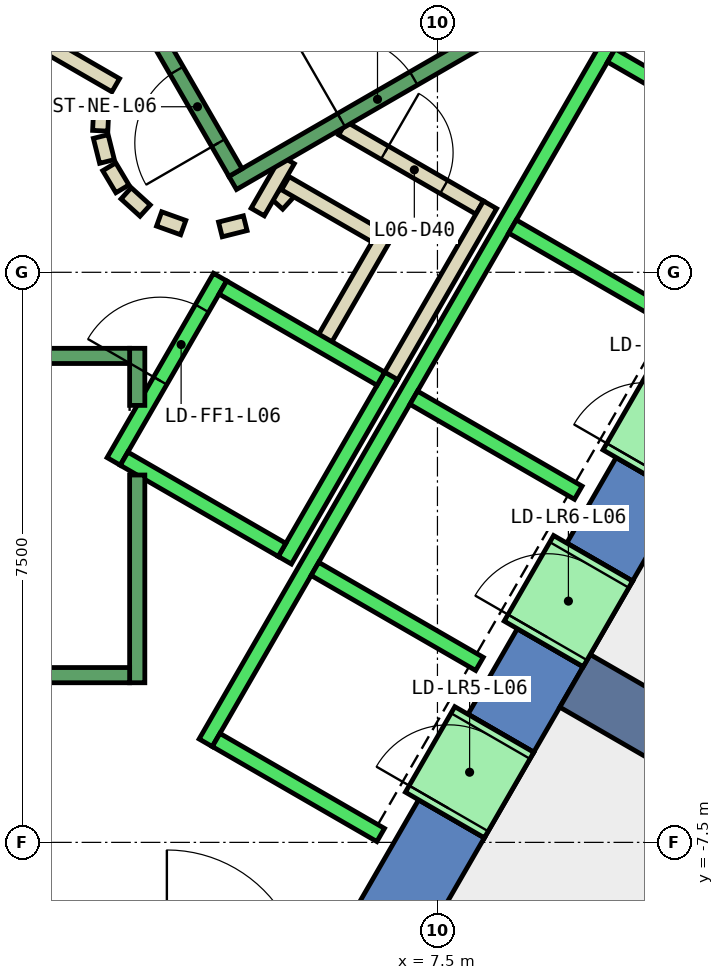
"""IFC4 building model, lengths in metres.
Left out: names, types, materials, properties, quantities, classifications, styles, units other than length and angle.
Written with IfcOpenShell. Run it as: python <this file> out.ifc"""

import sys

from ifc_helpers import new_model, si_unit, direction, frame, frame_2d, origin, place, context, subcontext, project, spatial, polyline, rectangle, outline, extrude, element, fill, save


model = new_model("IFC4")
c1 = context("Model", 3, precision=1e-05, world=origin(), true_north=direction((0.0, 1.0)))
c2 = subcontext(c1, "Body", "Model", "MODEL_VIEW")
j1 = project(units=[si_unit("LENGTHUNIT", "METRE"), si_unit("PLANEANGLEUNIT", "RADIAN")], contexts=[c1])
p1 = place(None, origin())
s1 = spatial("IfcSite", under=j1, at=p1, CompositionType="ELEMENT")
p2 = place(p1, origin())
s2 = spatial("IfcBuilding", under=s1, at=p2, CompositionType="ELEMENT")
p3 = place(p2, frame((0.0, 0.0, 35.0)))
s3 = spatial("IfcBuildingStorey", under=s2, at=p3, CompositionType="ELEMENT", Elevation=35.0)
p4 = place(p3, frame((0.0, 0.0, -0.6)))
e1 = element("IfcWall", 1, at=p4, inside=s3, PredefinedType="SHEAR", context=c2, shape_type="SweptSolid", body=[
    extrude(outline(polyline([(8.517, 11.748), (7.651, 11.248), (12.702, 2.5), (13.856, 2.5), (8.517, 11.748)])), origin(), (0.0, 0.0, 1.0), 4.4),
])
p5 = place(p3, frame((0.0, 0.0, -0.6)))
e2 = element("IfcWall", 2, at=p5, inside=s3, PredefinedType="SHEAR", context=c2, shape_type="SweptSolid", body=[
    extrude(outline(polyline([(8.117, -7.44), (7.252, -6.94), (6.351, -8.5), (6.928, -9.5), (8.117, -7.44)])), origin(), (0.0, 0.0, 1.0), 4.4),
])
p6 = place(p3, frame((0.0, 0.0, -0.6)))
e3 = element("IfcWall", 3, at=p6, inside=s3, PredefinedType="SHEAR", context=c2, shape_type="SweptSolid", body=[
    extrude(outline(polyline([(9.417, -5.189), (8.551, -4.689), (7.902, -5.814), (8.767, -6.314), (9.417, -5.189)])), origin(), (0.0, 0.0, 1.0), 4.4),
])
p7 = place(p3, frame((0.0, 0.0, -0.6)))
e4 = element("IfcWall", 4, at=p7, inside=s3, PredefinedType="SHEAR", context=c2, shape_type="SweptSolid", body=[
    extrude(outline(polyline([(10.717, -2.937), (9.851, -2.437), (9.201, -3.563), (10.067, -4.063), (10.717, -2.937)])), origin(), (0.0, 0.0, 1.0), 4.4),
])
p8 = place(p3, frame((0.0, 0.0, 3.6)))
e5 = element("IfcWall", 5, at=p8, inside=s3, PredefinedType="SHEAR", context=c2, shape_type="SweptSolid", body=[
    extrude(outline(polyline([(8.767, -6.314), (7.902, -5.814), (7.252, -6.94), (8.117, -7.44), (8.767, -6.314)])), origin(), (0.0, 0.0, 1.0), 0.2),
])
p9 = place(p3, frame((0.0, 0.0, 3.6)))
e6 = element("IfcWall", 6, at=p9, inside=s3, PredefinedType="SHEAR", context=c2, shape_type="SweptSolid", body=[
    extrude(outline(polyline([(10.067, -4.063), (9.201, -3.563), (8.551, -4.689), (9.417, -5.189), (10.067, -4.063)])), origin(), (0.0, 0.0, 1.0), 0.2),
])
p10 = place(p3, frame((0.0, 0.0, 3.6)))
e7 = element("IfcWall", 7, at=p10, inside=s3, PredefinedType="SHEAR", context=c2, shape_type="SweptSolid", body=[
    extrude(outline(polyline([(11.367, -1.811), (10.501, -1.311), (9.851, -2.437), (10.717, -2.937), (11.367, -1.811)])), origin(), (0.0, 0.0, 1.0), 0.2),
])
p11 = place(p3, frame((9.31, -5.375, -0.6), z_axis=(0.0, 0.0, 1.0), x_axis=(0.866017533419, -0.500013631625, 0.0)))
e8 = element("IfcWall", 8, at=p11, inside=s3, PredefinedType="SHEAR", context=c2, shape_type="SweptSolid", body=[
    extrude(rectangle(XDim=9.0, YDim=0.8, at=frame_2d((4.5, 0.0))), origin(), (0.0, 0.0, 1.0), 4.4),
])
p12 = place(p3, frame((5.39, 0.898, 0.0), z_axis=(0.0, 0.0, 1.0), x_axis=(0.673828488714, 0.738887791073, 0.0)))
e9 = element("IfcWall", 9, at=p12, inside=s3, PredefinedType="PARTITIONING", context=c2, shape_type="SweptSolid", body=[
    extrude(rectangle(XDim=0.263, YDim=0.2, at=frame_2d((0.131, 0.0))), origin(), (0.0, 0.0, 1.0), 3.8),
])
p13 = place(p3, frame((5.499, 1.172, 0.0), z_axis=(0.0, 0.0, 1.0), x_axis=(0.866333505267, -0.499465972466, 0.0)))
e10 = element("IfcWall", 10, at=p13, inside=s3, PredefinedType="PARTITIONING", context=c2, shape_type="SweptSolid", body=[
    extrude(rectangle(XDim=1.374, YDim=0.2, at=frame_2d((0.687, 0.0))), origin(), (0.0, 0.0, 1.0), 3.8),
])
p14 = place(p3, frame((6.826, 0.522, 0.0), z_axis=(0.0, 0.0, 1.0), x_axis=(-0.500016722714, -0.866015748706, 0.0)))
e11 = element("IfcWall", 11, at=p14, inside=s3, PredefinedType="PARTITIONING", context=c2, shape_type="SweptSolid", body=[
    extrude(rectangle(XDim=1.7, YDim=0.2, at=frame_2d((0.85, 0.0))), origin(), (0.0, 0.0, 1.0), 3.8),
])
p15 = place(p3, frame((6.25, 1.894, 0.0), z_axis=(0.0, 0.0, 1.0), x_axis=(0.866043184279, -0.499969202016, 0.0)))
e12 = element("IfcWall", 12, at=p15, inside=s3, PredefinedType="PARTITIONING", context=c2, shape_type="SweptSolid", body=[
    extrude(rectangle(XDim=2.084, YDim=0.2, at=frame_2d((1.042, 0.0))), origin(), (0.0, 0.0, 1.0), 3.8),
])
p16 = place(p15, frame((0.642, 0.0, 0.0)))
e13 = element("IfcOpeningElement", 13, at=p16, cuts=e12, PredefinedType="OPENING", context=c2, shape_type="SweptSolid", body=[
    extrude(rectangle(XDim=0.9, YDim=2.1, at=frame_2d((0.45, 1.05))), frame((0.0, 0.11, 0.0), z_axis=(0.0, -1.0, 0.0), x_axis=(1.0, 0.0, 0.0)), (0.0, 0.0, 1.0), 0.22),
])
p17 = place(p3, frame((8.192, 0.888, 0.0), z_axis=(0.0, 0.0, 1.0), x_axis=(-0.499940625693, -0.866059680843, 0.0)))
e14 = element("IfcWall", 14, at=p17, inside=s3, PredefinedType="PARTITIONING", context=c2, shape_type="SweptSolid", body=[
    extrude(rectangle(XDim=2.68, YDim=0.2, at=frame_2d((1.34, 0.0))), origin(), (0.0, 0.0, 1.0), 3.8),
])
p18 = place(p3, frame((5.135, 0.793, 0.0), z_axis=(0.0, 0.0, 1.0), x_axis=(0.499526442893, 0.866298639529, 0.0)))
e15 = element("IfcWall", 15, at=p18, inside=s3, PredefinedType="PARTITIONING", context=c2, shape_type="SweptSolid", body=[
    extrude(rectangle(XDim=0.791, YDim=0.2, at=frame_2d((0.396, 0.0))), origin(), (0.0, 0.0, 1.0), 3.8),
])
p19 = place(p3, frame((2.012, 3.186, 0.0), z_axis=(0.0, 0.0, 1.0), x_axis=(0.865891012941, -0.500232699559, 0.0)))
e16 = element("IfcWall", 16, at=p19, inside=s3, PredefinedType="PARTITIONING", context=c2, shape_type="SweptSolid", body=[
    extrude(rectangle(XDim=1.449, YDim=0.2, at=frame_2d((0.725, 0.0))), origin(), (0.0, 0.0, 1.0), 3.8),
])
p20 = place(p3, frame((3.079, 2.199, 0.0), z_axis=(0.0, 0.0, 1.0), x_axis=(-0.047771483479, -0.998858290933, 0.0)))
e17 = element("IfcWall", 17, at=p20, inside=s3, PredefinedType="PARTITIONING", context=c2, shape_type="SweptSolid", body=[
    extrude(rectangle(XDim=0.337, YDim=0.2, at=frame_2d((0.169, 0.0))), origin(), (0.0, 0.0, 1.0), 3.8),
])
p21 = place(p3, frame((3.07, 1.786, 0.0), z_axis=(0.0, 0.0, 1.0), x_axis=(0.242705583207, -0.970099994784, 0.0)))
e18 = element("IfcWall", 18, at=p21, inside=s3, PredefinedType="PARTITIONING", context=c2, shape_type="SweptSolid", body=[
    extrude(rectangle(XDim=0.338, YDim=0.2, at=frame_2d((0.169, 0.0))), origin(), (0.0, 0.0, 1.0), 3.8),
])
for number, where, z_axis, x_axis in (
    (19, (3.182, 1.388, 0.0), (0.0, 0.0, 1.0), (0.512, -0.859, 0.0)),
    (20, (3.404, 1.039, 0.0), (0.0, 0.0, 1.0), (0.74, -0.672, 0.0)),
):
    element("IfcWall", number, at=place(p3, frame(where, z_axis=z_axis, x_axis=x_axis)), inside=s3, PredefinedType="PARTITIONING", context=c2, shape_type="SweptSolid", body=[
        extrude(rectangle(XDim=0.338, YDim=0.2, at=frame_2d((0.169, 0.0))), origin(), (0.0, 0.0, 1.0), 3.8),
    ])
p22 = place(p3, frame((3.838, 0.702, 0.0), z_axis=(0.0, 0.0, 1.0), x_axis=(0.941035081519, -0.338308993895, 0.0)))
e21 = element("IfcWall", 21, at=p22, inside=s3, PredefinedType="PARTITIONING", context=c2, shape_type="SweptSolid", body=[
    extrude(rectangle(XDim=0.337, YDim=0.2, at=frame_2d((0.168, 0.0))), origin(), (0.0, 0.0, 1.0), 3.8),
])
p23 = place(p3, frame((4.644, 0.564, 0.0), z_axis=(0.0, 0.0, 1.0), x_axis=(0.969929076366, 0.243387729394, 0.0)))
e22 = element("IfcWall", 22, at=p23, inside=s3, PredefinedType="PARTITIONING", context=c2, shape_type="SweptSolid", body=[
    extrude(rectangle(XDim=0.337, YDim=0.2, at=frame_2d((0.168, 0.0))), origin(), (0.0, 0.0, 1.0), 3.8),
])
p24 = place(p3, frame((12.401, -7.621, 0.0), z_axis=(0.0, 0.0, 1.0), x_axis=(-0.499983724212, -0.866034800411, 0.0)))
e23 = element("IfcWall", 23, at=p24, inside=s3, PredefinedType="PARTITIONING", context=c2, shape_type="SweptSolid", body=[
    extrude(rectangle(XDim=9.302, YDim=0.2, at=frame_2d((4.651, 0.0))), origin(), (0.0, 0.0, 1.0), 3.8),
])
p25 = place(p24, frame((1.429, 0.0, 0.0)))
e24 = element("IfcOpeningElement", 24, at=p25, cuts=e23, PredefinedType="OPENING", context=c2, shape_type="SweptSolid", body=[
    extrude(rectangle(XDim=1.0, YDim=2.1, at=frame_2d((0.5, 1.05))), frame((0.0, 0.11, 0.0), z_axis=(0.0, -1.0, 0.0), x_axis=(1.0, 0.0, 0.0)), (0.0, 0.0, 1.0), 0.22),
])
p26 = place(p24, frame((2.529, 0.0, 0.0)))
e25 = element("IfcOpeningElement", 25, at=p26, cuts=e23, PredefinedType="OPENING", context=c2, shape_type="SweptSolid", body=[
    extrude(rectangle(XDim=1.0, YDim=2.1, at=frame_2d((0.5, 1.05))), frame((0.0, 0.11, 0.0), z_axis=(0.0, -1.0, 0.0), x_axis=(1.0, 0.0, 0.0)), (0.0, 0.0, 1.0), 0.22),
])
p27 = place(p3, frame((3.24, -2.488, 0.0), z_axis=(0.0, 0.0, 1.0), x_axis=(0.49994636267, 0.866056369097, 0.0)))
e26 = element("IfcWall", 26, at=p27, inside=s3, PredefinedType="STANDARD", context=c2, shape_type="SweptSolid", body=[
    extrude(rectangle(XDim=2.8, YDim=0.2, at=frame_2d((1.4, 0.0))), origin(), (0.0, 0.0, 1.0), 3.8),
])
p28 = place(p27, frame((1.225, 0.0, 0.0)))
e27 = element("IfcOpeningElement", 27, at=p28, cuts=e26, PredefinedType="OPENING", context=c2, shape_type="SweptSolid", body=[
    extrude(rectangle(XDim=1.1, YDim=2.1, at=frame_2d((0.55, 1.05))), frame((0.0, 0.11, 0.0), z_axis=(0.0, -1.0, 0.0), x_axis=(1.0, 0.0, 0.0)), (0.0, 0.0, 1.0), 0.22),
])
p29 = place(p3, frame((5.492, -3.788, 0.0), z_axis=(0.0, 0.0, 1.0), x_axis=(0.500011755427, 0.866018616679, 0.0)))
e28 = element("IfcWall", 28, at=p29, inside=s3, PredefinedType="STANDARD", context=c2, shape_type="SweptSolid", body=[
    extrude(rectangle(XDim=2.8, YDim=0.2, at=frame_2d((1.4, 0.0))), origin(), (0.0, 0.0, 1.0), 3.8),
])
p30 = place(p3, frame((3.377, -2.452, 0.0), z_axis=(0.0, 0.0, 1.0), x_axis=(0.865955154139, -0.50012165622, 0.0)))
e29 = element("IfcWall", 29, at=p30, inside=s3, PredefinedType="STANDARD", context=c2, shape_type="SweptSolid", body=[
    extrude(rectangle(XDim=2.4, YDim=0.2, at=frame_2d((1.2, 0.0))), origin(), (0.0, 0.0, 1.0), 3.8),
])
p31 = place(p3, frame((4.677, -0.2, 0.0), z_axis=(0.0, 0.0, 1.0), x_axis=(0.865973769406, -0.500089422704, 0.0)))
e30 = element("IfcWall", 30, at=p31, inside=s3, PredefinedType="STANDARD", context=c2, shape_type="SweptSolid", body=[
    extrude(rectangle(XDim=2.399, YDim=0.2, at=frame_2d((1.2, 0.0))), origin(), (0.0, 0.0, 1.0), 3.8),
])
p32 = place(p3, frame((4.451, -6.19, 0.0), z_axis=(0.0, 0.0, 1.0), x_axis=(0.50000090737, 0.866024879913, 0.0)))
e31 = element("IfcWall", 31, at=p32, inside=s3, PredefinedType="STANDARD", context=c2, shape_type="SweptSolid", body=[
    extrude(rectangle(XDim=10.6, YDim=0.2, at=frame_2d((5.3, 0.0))), origin(), (0.0, 0.0, 1.0), 3.8),
])
for number, where, z_axis, x_axis in (
    (32, (4.588, -6.153, 0.0), (0.0, 0.0, 1.0), (0.866, -0.5, 0.0)),
    (33, (5.888, -3.902, 0.0), (0.0, 0.0, 1.0), (0.866, -0.5, 0.0)),
    (34, (7.188, -1.65, 0.0), (0.0, 0.0, 1.0), (0.866, -0.5, 0.0)),
    (35, (8.488, 0.602, 0.0), (0.0, 0.0, 1.0), (0.866, -0.5, 0.0)),
):
    element("IfcWall", number, at=place(p3, frame(where, z_axis=z_axis, x_axis=x_axis)), inside=s3, PredefinedType="STANDARD", context=c2, shape_type="SweptSolid", body=[
        extrude(rectangle(XDim=2.5, YDim=0.2, at=frame_2d((1.25, 0.0))), origin(), (0.0, 0.0, 1.0), 3.8),
    ])
p33 = place(p3, frame((9.788, 2.853, 0.0), z_axis=(0.0, 0.0, 1.0), x_axis=(0.865998541277, -0.500046524342, 0.0)))
e36 = element("IfcWall", 36, at=p33, inside=s3, PredefinedType="STANDARD", context=c2, shape_type="SweptSolid", body=[
    extrude(rectangle(XDim=2.5, YDim=0.2, at=frame_2d((1.25, 0.0))), origin(), (0.0, 0.0, 1.0), 3.8),
])
p34 = place(p3, frame((7.598, -7.14, 0.0), z_axis=(0.0, 0.0, 1.0), x_axis=(0.500362116554, 0.865816234728, 0.0)))
e37 = element("IfcWall", 37, at=p34, inside=s3, PredefinedType="STANDARD", context=c2, shape_type="SweptSolid", body=[
    extrude(rectangle(XDim=1.299, YDim=1.2, at=frame_2d((0.65, 0.0))), origin(), (0.0, 0.0, 1.0), 2.4),
])
p35 = place(p34, frame((0.1, 0.0, 0.0)))
e38 = element("IfcOpeningElement", 38, at=p35, cuts=e37, PredefinedType="OPENING", context=c2, shape_type="SweptSolid", body=[
    extrude(rectangle(XDim=1.1, YDim=2.3, at=frame_2d((0.55, 1.15))), frame((0.0, 0.61, 0.0), z_axis=(0.0, -1.0, 0.0), x_axis=(1.0, 0.0, 0.0)), (0.0, 0.0, 1.0), 1.22),
])
p36 = place(p3, frame((8.898, -4.889, 0.0), z_axis=(0.0, 0.0, 1.0), x_axis=(0.500036693733, 0.866004217611, 0.0)))
e39 = element("IfcWall", 39, at=p36, inside=s3, PredefinedType="STANDARD", context=c2, shape_type="SweptSolid", body=[
    extrude(rectangle(XDim=1.3, YDim=1.2, at=frame_2d((0.65, 0.0))), origin(), (0.0, 0.0, 1.0), 2.4),
])
p37 = place(p36, frame((0.1, 0.0, 0.0)))
e40 = element("IfcOpeningElement", 40, at=p37, cuts=e39, PredefinedType="OPENING", context=c2, shape_type="SweptSolid", body=[
    extrude(rectangle(XDim=1.1, YDim=2.3, at=frame_2d((0.55, 1.15))), frame((0.0, 0.61, 0.0), z_axis=(0.0, -1.0, 0.0), x_axis=(1.0, 0.0, 0.0)), (0.0, 0.0, 1.0), 1.22),
])
p38 = place(p3, frame((10.198, -2.637, 0.0), z_axis=(0.0, 0.0, 1.0), x_axis=(0.49989585183, 0.866085525409, 0.0)))
e41 = element("IfcWall", 41, at=p38, inside=s3, PredefinedType="STANDARD", context=c2, shape_type="SweptSolid", body=[
    extrude(rectangle(XDim=1.3, YDim=1.2, at=frame_2d((0.65, 0.0))), origin(), (0.0, 0.0, 1.0), 2.4),
])
p39 = place(p38, frame((0.1, 0.0, 0.0)))
e42 = element("IfcOpeningElement", 42, at=p39, cuts=e41, PredefinedType="OPENING", context=c2, shape_type="SweptSolid", body=[
    extrude(rectangle(XDim=1.1, YDim=2.3, at=frame_2d((0.55, 1.15))), frame((0.0, 0.61, 0.0), z_axis=(0.0, -1.0, 0.0), x_axis=(1.0, 0.0, 0.0)), (0.0, 0.0, 1.0), 1.22),
])
p40 = place(p3, frame((3.55, -2.667, 0.0), z_axis=(0.0, 0.0, 1.0), x_axis=(0.0, -1.0, 0.0)))
e43 = element("IfcWall", 43, at=p40, inside=s3, PredefinedType="STANDARD", context=c2, shape_type="SweptSolid", body=[
    extrude(rectangle(XDim=2.733, YDim=0.2, at=frame_2d((1.366, 0.0))), origin(), (0.0, 0.0, 1.0), 3.8),
])
p41 = place(p3, frame((3.55, -1.0, 0.0), z_axis=(0.0, 0.0, 1.0), x_axis=(0.0, -1.0, 0.0)))
e44 = element("IfcWall", 44, at=p41, inside=s3, PredefinedType="STANDARD", context=c2, shape_type="SweptSolid", body=[
    extrude(rectangle(XDim=0.751, YDim=0.2, at=frame_2d((0.375, 0.0))), origin(), (0.0, 0.0, 1.0), 3.8),
])
p42 = place(p3, frame((-3.45, -1.1, 0.0), z_axis=(0.0, 0.0, 1.0), x_axis=(1.0, 0.0, 0.0)))
e45 = element("IfcWall", 45, at=p42, inside=s3, PredefinedType="STANDARD", context=c2, shape_type="SweptSolid", body=[
    extrude(rectangle(XDim=6.9, YDim=0.2, at=frame_2d((3.45, 0.0))), origin(), (0.0, 0.0, 1.0), 3.8),
])
p43 = place(p42, frame((0.45, 0.0, 0.0)))
e46 = element("IfcOpeningElement", 46, at=p43, cuts=e45, PredefinedType="OPENING", context=c2, shape_type="SweptSolid", body=[
    extrude(rectangle(XDim=1.1, YDim=2.2, at=frame_2d((0.55, 1.1))), frame((0.0, 0.11, 0.0), z_axis=(0.0, -1.0, 0.0), x_axis=(1.0, 0.0, 0.0)), (0.0, 0.0, 1.0), 0.22),
])
p44 = place(p3, frame((-3.45, -5.3, 0.0), z_axis=(0.0, 0.0, 1.0), x_axis=(1.0, 0.0, 0.0)))
e47 = element("IfcWall", 47, at=p44, inside=s3, PredefinedType="STANDARD", context=c2, shape_type="SweptSolid", body=[
    extrude(rectangle(XDim=6.9, YDim=0.2, at=frame_2d((3.45, 0.0))), origin(), (0.0, 0.0, 1.0), 3.8),
])
p45 = place(p3, frame((4.806, 1.176, 0.0), z_axis=(0.0, 0.0, 1.0), x_axis=(0.866059941101, 0.499940174841, 0.0)))
e48 = element("IfcWall", 48, at=p45, inside=s3, PredefinedType="STANDARD", context=c2, shape_type="SweptSolid", body=[
    extrude(rectangle(XDim=4.4, YDim=0.2, at=frame_2d((2.2, 0.0))), origin(), (0.0, 0.0, 1.0), 3.8),
])
p46 = place(p45, frame((1.65, 0.0, 0.0)))
e49 = element("IfcOpeningElement", 49, at=p46, cuts=e48, PredefinedType="OPENING", context=c2, shape_type="SweptSolid", body=[
    extrude(rectangle(XDim=1.1, YDim=2.2, at=frame_2d((0.55, 1.1))), frame((0.0, 0.11, 0.0), z_axis=(0.0, -1.0, 0.0), x_axis=(1.0, 0.0, 0.0)), (0.0, 0.0, 1.0), 0.22),
])
p47 = place(p3, frame((4.843, 1.312, 0.0), z_axis=(0.0, 0.0, 1.0), x_axis=(-0.499963383562, 0.866046543262, 0.0)))
e50 = element("IfcWall", 50, at=p47, inside=s3, PredefinedType="STANDARD", context=c2, shape_type="SweptSolid", body=[
    extrude(rectangle(XDim=6.9, YDim=0.2, at=frame_2d((3.45, 0.0))), origin(), (0.0, 0.0, 1.0), 3.8),
])
p48 = place(p47, frame((0.45, 0.0, 0.0)))
e51 = element("IfcOpeningElement", 51, at=p48, cuts=e50, PredefinedType="OPENING", context=c2, shape_type="SweptSolid", body=[
    extrude(rectangle(XDim=1.1, YDim=2.2, at=frame_2d((0.55, 1.1))), frame((0.0, 0.11, 0.0), z_axis=(0.0, -1.0, 0.0), x_axis=(1.0, 0.0, 0.0)), (0.0, 0.0, 1.0), 0.22),
])
p49 = place(p16, origin())
e52 = element("IfcDoor", 52, at=p49, inside=s3, OperationType="SINGLE_SWING_LEFT", PredefinedType="DOOR", context=c2, shape_type="SweptSolid", body=[
    extrude(rectangle(XDim=0.9, YDim=2.1, at=frame_2d((0.45, 1.05))), frame((0.0, 0.025, 0.0), z_axis=(0.0, -1.0, 0.0), x_axis=(1.0, 0.0, 0.0)), (0.0, 0.0, 1.0), 0.05),
])
fill(e13, e52)
p50 = place(p35, origin())
e53 = element("IfcDoor", 53, at=p50, inside=s3, OperationType="SLIDING_TO_LEFT", PredefinedType="DOOR", context=c2, shape_type="SweptSolid", body=[
    extrude(rectangle(XDim=1.1, YDim=2.3, at=frame_2d((0.55, 1.15))), frame((0.0, 0.025, 0.0), z_axis=(0.0, -1.0, 0.0), x_axis=(1.0, 0.0, 0.0)), (0.0, 0.0, 1.0), 0.05),
])
fill(e38, e53)
p51 = place(p37, origin())
e54 = element("IfcDoor", 54, at=p51, inside=s3, OperationType="SLIDING_TO_LEFT", PredefinedType="DOOR", context=c2, shape_type="SweptSolid", body=[
    extrude(rectangle(XDim=1.1, YDim=2.3, at=frame_2d((0.55, 1.15))), frame((0.0, 0.025, 0.0), z_axis=(0.0, -1.0, 0.0), x_axis=(1.0, 0.0, 0.0)), (0.0, 0.0, 1.0), 0.05),
])
fill(e40, e54)
p52 = place(p28, origin())
e55 = element("IfcDoor", 55, at=p52, inside=s3, OperationType="SLIDING_TO_LEFT", PredefinedType="DOOR", context=c2, shape_type="SweptSolid", body=[
    extrude(rectangle(XDim=1.1, YDim=2.1, at=frame_2d((0.55, 1.05))), frame((0.0, 0.025, 0.0), z_axis=(0.0, -1.0, 0.0), x_axis=(1.0, 0.0, 0.0)), (0.0, 0.0, 1.0), 0.05),
])
fill(e27, e55)
p53 = place(p48, origin())
e56 = element("IfcDoor", 56, at=p53, inside=s3, OperationType="SINGLE_SWING_LEFT", PredefinedType="DOOR", context=c2, shape_type="SweptSolid", body=[
    extrude(rectangle(XDim=1.1, YDim=2.2, at=frame_2d((0.55, 1.1))), frame((0.0, 0.025, 0.0), z_axis=(0.0, -1.0, 0.0), x_axis=(1.0, 0.0, 0.0)), (0.0, 0.0, 1.0), 0.05),
])
fill(e51, e56)
p54 = place(p46, origin())
e57 = element("IfcDoor", 57, at=p54, inside=s3, OperationType="SINGLE_SWING_LEFT", PredefinedType="DOOR", context=c2, shape_type="SweptSolid", body=[
    extrude(rectangle(XDim=1.1, YDim=2.2, at=frame_2d((0.55, 1.1))), frame((0.0, 0.025, 0.0), z_axis=(0.0, -1.0, 0.0), x_axis=(1.0, 0.0, 0.0)), (0.0, 0.0, 1.0), 0.05),
])
fill(e49, e57)
save(model, sys.argv[1])
